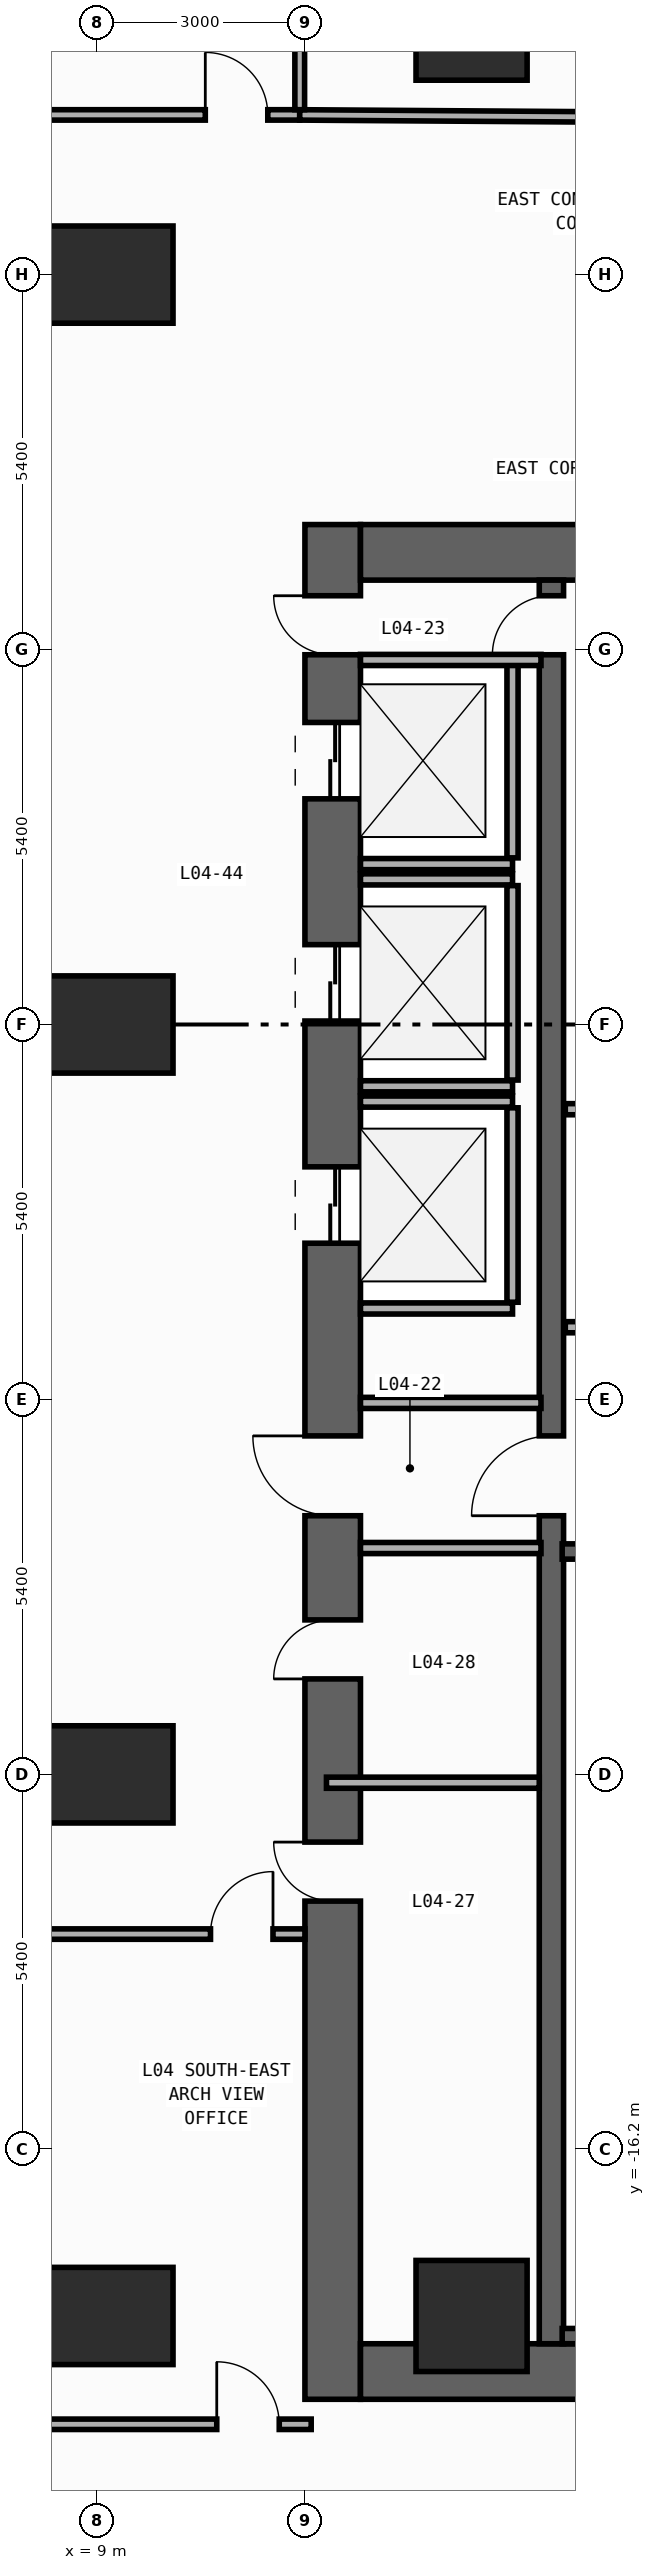
"""IFC4 building model, lengths in metres.
Left out: names, types, materials, properties, quantities, classifications, styles, units other than length and angle.
Written with IfcOpenShell. Run it as: python <this file> out.ifc"""

import sys

from ifc_helpers import new_model, si_unit, direction, frame, frame_2d, origin, origin_2d, place, context, subcontext, project, spatial, rectangle, extrude, element, fill, save


model = new_model("IFC4")
c1 = context("Model", 3, precision=1e-05, world=origin(), true_north=direction((0.0, 1.0)))
c2 = subcontext(c1, "Body", "Model", "MODEL_VIEW")
j1 = project(units=[si_unit("LENGTHUNIT", "METRE"), si_unit("PLANEANGLEUNIT", "RADIAN")], contexts=[c1])
p1 = place(None, origin())
s1 = spatial("IfcSite", under=j1, at=p1, CompositionType="ELEMENT")
p2 = place(p1, origin())
s2 = spatial("IfcBuilding", under=s1, at=p2, CompositionType="ELEMENT")
p3 = place(p2, frame((0.0, 0.0, 16.0)))
s3 = spatial("IfcBuildingStorey", under=s2, at=p3, CompositionType="ELEMENT", Elevation=16.0)
p4 = place(p3, frame((12.4, -19.8, 0.0), z_axis=(0.0, 0.0, 1.0), x_axis=(0.0, 1.0, 0.0)))
e1 = element("IfcWall", 1, at=p4, inside=s3, PredefinedType="SHEAR", context=c2, shape_type="SweptSolid", body=[
    extrude(rectangle(XDim=27.0, YDim=0.8, at=frame_2d((13.5, 0.0))), origin(), (0.0, 0.0, 1.0), 4.55),
])
p5 = place(p4, frame((23.05, 0.0, 0.0)))
e2 = element("IfcOpeningElement", 2, at=p5, cuts=e1, PredefinedType="OPENING", context=c2, shape_type="SweptSolid", body=[
    extrude(rectangle(XDim=1.1, YDim=2.2, at=frame_2d((0.55, 1.1))), frame((0.0, 0.41, 0.0), z_axis=(0.0, -1.0, 0.0), x_axis=(1.0, 0.0, 0.0)), (0.0, 0.0, 1.0), 0.82),
])
p6 = place(p4, frame((19.85, 0.0, 0.0)))
e3 = element("IfcOpeningElement", 3, at=p6, cuts=e1, PredefinedType="OPENING", context=c2, shape_type="SweptSolid", body=[
    extrude(rectangle(XDim=1.1, YDim=2.2, at=frame_2d((0.55, 1.1))), frame((0.0, 0.41, 0.0), z_axis=(0.0, -1.0, 0.0), x_axis=(1.0, 0.0, 0.0)), (0.0, 0.0, 1.0), 0.82),
])
p7 = place(p4, frame((16.65, 0.0, 0.0)))
e4 = element("IfcOpeningElement", 4, at=p7, cuts=e1, PredefinedType="OPENING", context=c2, shape_type="SweptSolid", body=[
    extrude(rectangle(XDim=1.1, YDim=2.2, at=frame_2d((0.55, 1.1))), frame((0.0, 0.41, 0.0), z_axis=(0.0, -1.0, 0.0), x_axis=(1.0, 0.0, 0.0)), (0.0, 0.0, 1.0), 0.82),
])
p8 = place(p4, frame((7.175, 0.0, 0.0)))
e5 = element("IfcOpeningElement", 5, at=p8, cuts=e1, PredefinedType="OPENING", context=c2, shape_type="SweptSolid", body=[
    extrude(rectangle(XDim=0.85, YDim=2.1, at=frame_2d((0.425, 1.05))), frame((0.0, 0.41, 0.0), z_axis=(0.0, -1.0, 0.0), x_axis=(1.0, 0.0, 0.0)), (0.0, 0.0, 1.0), 0.82),
])
p9 = place(p4, frame((10.375, 0.0, 0.0)))
e6 = element("IfcOpeningElement", 6, at=p9, cuts=e1, PredefinedType="OPENING", context=c2, shape_type="SweptSolid", body=[
    extrude(rectangle(XDim=0.85, YDim=2.1, at=frame_2d((0.425, 1.05))), frame((0.0, 0.41, 0.0), z_axis=(0.0, -1.0, 0.0), x_axis=(1.0, 0.0, 0.0)), (0.0, 0.0, 1.0), 0.82),
])
p10 = place(p4, frame((12.725, 0.0, 0.0)))
e7 = element("IfcOpeningElement", 7, at=p10, cuts=e1, PredefinedType="OPENING", context=c2, shape_type="SweptSolid", body=[
    extrude(rectangle(XDim=1.15, YDim=2.2, at=frame_2d((0.575, 1.1))), frame((0.0, 0.41, 0.0), z_axis=(0.0, -1.0, 0.0), x_axis=(1.0, 0.0, 0.0)), (0.0, 0.0, 1.0), 0.82),
])
p11 = place(p4, frame((25.125, 0.0, 0.0)))
e8 = element("IfcOpeningElement", 8, at=p11, cuts=e1, PredefinedType="OPENING", context=c2, shape_type="SweptSolid", body=[
    extrude(rectangle(XDim=0.85, YDim=2.1, at=frame_2d((0.425, 1.05))), frame((0.0, 0.41, 0.0), z_axis=(0.0, -1.0, 0.0), x_axis=(1.0, 0.0, 0.0)), (0.0, 0.0, 1.0), 0.82),
])
for number, where, z_axis, x_axis in (
    (9, (12.8, -19.4, 0.0), (0.0, 0.0, 1.0), (1.0, 0.0, 0.0)),
    (10, (12.8, 6.8, 0.0), (0.0, 0.0, 1.0), (1.0, 0.0, 0.0)),
):
    element("IfcWall", number, at=place(p3, frame(where, z_axis=z_axis, x_axis=x_axis)), inside=s3, PredefinedType="SHEAR", context=c2, shape_type="SweptSolid", body=[
        extrude(rectangle(XDim=6.8, YDim=0.8, at=frame_2d((3.4, 0.0))), origin(), (0.0, 0.0, 1.0), 4.55),
    ])
p12 = place(p3, frame((15.55, -19.0, 0.0), z_axis=(0.0, 0.0, 1.0), x_axis=(0.0, 1.0, 0.0)))
e11 = element("IfcWall", 11, at=p12, inside=s3, PredefinedType="SHEAR", context=c2, shape_type="SweptSolid", body=[
    extrude(rectangle(XDim=25.4, YDim=0.35, at=frame_2d((12.7, 0.0))), origin(), (0.0, 0.0, 1.0), 4.55),
])
p13 = place(p12, frame((11.925, 0.0, 0.0)))
e12 = element("IfcOpeningElement", 12, at=p13, cuts=e11, PredefinedType="OPENING", context=c2, shape_type="SweptSolid", body=[
    extrude(rectangle(XDim=1.15, YDim=2.2, at=frame_2d((0.575, 1.1))), frame((0.0, 0.185, 0.0), z_axis=(0.0, -1.0, 0.0), x_axis=(1.0, 0.0, 0.0)), (0.0, 0.0, 1.0), 0.37),
])
p14 = place(p12, frame((24.325, 0.0, 0.0)))
e13 = element("IfcOpeningElement", 13, at=p14, cuts=e11, PredefinedType="OPENING", context=c2, shape_type="SweptSolid", body=[
    extrude(rectangle(XDim=0.85, YDim=2.1, at=frame_2d((0.425, 1.05))), frame((0.0, 0.185, 0.0), z_axis=(0.0, -1.0, 0.0), x_axis=(1.0, 0.0, 0.0)), (0.0, 0.0, 1.0), 0.37),
])
p15 = place(p3, frame((15.705, -18.89, 0.0), z_axis=(0.0, 0.0, 1.0), x_axis=(1.0, 0.0, 0.0)))
e14 = element("IfcWall", 14, at=p15, inside=s3, PredefinedType="SHEAR", context=c2, shape_type="SweptSolid", body=[
    extrude(rectangle(XDim=3.915, YDim=0.22, at=frame_2d((1.958, 0.0))), origin(), (0.0, 0.0, 1.0), 4.55),
])
p16 = place(p3, frame((19.62, -7.59, 0.0), z_axis=(0.0, 0.0, 1.0), x_axis=(-1.0, 0.0, 0.0)))
e15 = element("IfcWall", 15, at=p16, inside=s3, PredefinedType="SHEAR", context=c2, shape_type="SweptSolid", body=[
    extrude(rectangle(XDim=3.915, YDim=0.22, at=frame_2d((1.958, 0.0))), origin(), (0.0, 0.0, 1.0), 4.55),
])
p17 = place(p16, frame((1.08, 0.0, 0.0)))
e16 = element("IfcOpeningElement", 16, at=p17, cuts=e15, PredefinedType="OPENING", context=c2, shape_type="SweptSolid", body=[
    extrude(rectangle(XDim=1.1, YDim=2.2, at=frame_2d((0.55, 1.1))), frame((0.0, 0.12, 0.0), z_axis=(0.0, -1.0, 0.0), x_axis=(1.0, 0.0, 0.0)), (0.0, 0.0, 1.0), 0.24),
])
for number, where, z_axis, x_axis in (
    (17, (9.2, -18.6, 0.0), (0.0, 0.0, 1.0), (1.0, 0.0, 0.0)),
    (18, (9.2, -10.8, 0.0), (0.0, 0.0, 1.0), (1.0, 0.0, 0.0)),
    (19, (9.2, 0.0, 0.0), (0.0, 0.0, 1.0), (1.0, 0.0, 0.0)),
    (20, (9.2, 10.8, 0.0), (0.0, 0.0, 1.0), (1.0, 0.0, 0.0)),
):
    element("IfcColumn", number, at=place(p3, frame(where, z_axis=z_axis, x_axis=x_axis)), inside=s3, PredefinedType="COLUMN", context=c2, shape_type="SweptSolid", body=[
        extrude(rectangle(XDim=1.8, YDim=1.4, at=origin_2d()), origin(), (0.0, 0.0, 1.0), 5.0),
    ])
for number, where, z_axis, x_axis in (
    (21, (14.4, -18.6, 0.0), (0.0, 0.0, 1.0), (1.0, 0.0, 0.0)),
    (22, (14.4, 14.4, 0.0), (0.0, 0.0, 1.0), (1.0, 0.0, 0.0)),
):
    element("IfcColumn", number, at=place(p3, frame(where, z_axis=z_axis, x_axis=x_axis)), inside=s3, PredefinedType="COLUMN", context=c2, shape_type="SweptSolid", body=[
        extrude(rectangle(XDim=1.6, YDim=1.6, at=origin_2d()), origin(), (0.0, 0.0, 1.0), 5.0),
    ])
p18 = place(p3, frame((12.8, 2.31, 0.0), z_axis=(0.0, 0.0, 1.0), x_axis=(1.0, 0.0, 0.0)))
e23 = element("IfcWall", 23, at=p18, inside=s3, PredefinedType="STANDARD", context=c2, shape_type="SweptSolid", body=[
    extrude(rectangle(XDim=2.19, YDim=0.16, at=frame_2d((1.095, 0.0))), origin(), (0.0, 0.0, 1.0), 4.55),
])
p19 = place(p3, frame((14.99, 2.4, 0.0), z_axis=(0.0, 0.0, 1.0), x_axis=(0.0, 1.0, 0.0)))
e24 = element("IfcWall", 24, at=p19, inside=s3, PredefinedType="STANDARD", context=c2, shape_type="SweptSolid", body=[
    extrude(rectangle(XDim=2.8, YDim=0.16, at=frame_2d((1.4, 0.0))), origin(), (0.0, 0.0, 1.0), 4.55),
])
for number, where, z_axis, x_axis in (
    (25, (12.8, -0.89, 0.0), (0.0, 0.0, 1.0), (1.0, 0.0, 0.0)),
    (26, (12.8, 2.09, 0.0), (0.0, 0.0, 1.0), (1.0, 0.0, 0.0)),
):
    element("IfcWall", number, at=place(p3, frame(where, z_axis=z_axis, x_axis=x_axis)), inside=s3, PredefinedType="STANDARD", context=c2, shape_type="SweptSolid", body=[
        extrude(rectangle(XDim=2.19, YDim=0.16, at=frame_2d((1.095, 0.0))), origin(), (0.0, 0.0, 1.0), 4.55),
    ])
p20 = place(p3, frame((14.99, -0.8, 0.0), z_axis=(0.0, 0.0, 1.0), x_axis=(0.0, 1.0, 0.0)))
e27 = element("IfcWall", 27, at=p20, inside=s3, PredefinedType="STANDARD", context=c2, shape_type="SweptSolid", body=[
    extrude(rectangle(XDim=2.8, YDim=0.16, at=frame_2d((1.4, 0.0))), origin(), (0.0, 0.0, 1.0), 4.55),
])
for number, where, z_axis, x_axis in (
    (28, (12.8, -4.09, 0.0), (0.0, 0.0, 1.0), (1.0, 0.0, 0.0)),
    (29, (12.8, -1.11, 0.0), (0.0, 0.0, 1.0), (1.0, 0.0, 0.0)),
):
    element("IfcWall", number, at=place(p3, frame(where, z_axis=z_axis, x_axis=x_axis)), inside=s3, PredefinedType="STANDARD", context=c2, shape_type="SweptSolid", body=[
        extrude(rectangle(XDim=2.19, YDim=0.16, at=frame_2d((1.095, 0.0))), origin(), (0.0, 0.0, 1.0), 4.55),
    ])
p21 = place(p3, frame((14.99, -4.0, 0.0), z_axis=(0.0, 0.0, 1.0), x_axis=(0.0, 1.0, 0.0)))
e30 = element("IfcWall", 30, at=p21, inside=s3, PredefinedType="STANDARD", context=c2, shape_type="SweptSolid", body=[
    extrude(rectangle(XDim=2.8, YDim=0.16, at=frame_2d((1.4, 0.0))), origin(), (0.0, 0.0, 1.0), 4.55),
])
p22 = place(p3, frame((15.75, -4.36, 0.0), z_axis=(0.0, 0.0, 1.0), x_axis=(1.0, 0.0, 0.0)))
e31 = element("IfcWall", 31, at=p22, inside=s3, PredefinedType="STANDARD", context=c2, shape_type="SweptSolid", body=[
    extrude(rectangle(XDim=3.8, YDim=0.16, at=frame_2d((1.9, 0.0))), origin(), (0.0, 0.0, 1.0), 4.55),
])
p23 = place(p22, frame((1.47, 0.0, 0.0)))
e32 = element("IfcOpeningElement", 32, at=p23, cuts=e31, PredefinedType="OPENING", context=c2, shape_type="SweptSolid", body=[
    extrude(rectangle(XDim=1.15, YDim=2.2, at=frame_2d((0.575, 1.1))), frame((0.0, 0.09, 0.0), z_axis=(0.0, -1.0, 0.0), x_axis=(1.0, 0.0, 0.0)), (0.0, 0.0, 1.0), 0.18),
])
p24 = place(p3, frame((15.75, -1.22, 0.0), z_axis=(0.0, 0.0, 1.0), x_axis=(1.0, 0.0, 0.0)))
e33 = element("IfcWall", 33, at=p24, inside=s3, PredefinedType="STANDARD", context=c2, shape_type="SweptSolid", body=[
    extrude(rectangle(XDim=3.8, YDim=0.16, at=frame_2d((1.9, 0.0))), origin(), (0.0, 0.0, 1.0), 4.55),
])
for number, where, z_axis, x_axis in (
    (34, (12.8, -5.45, 0.0), (0.0, 0.0, 1.0), (1.0, 0.0, 0.0)),
    (35, (12.8, -7.54, 0.0), (0.0, 0.0, 1.0), (1.0, 0.0, 0.0)),
    (36, (12.8, 5.25, 0.0), (0.0, 0.0, 1.0), (1.0, 0.0, 0.0)),
):
    element("IfcWall", number, at=place(p3, frame(where, z_axis=z_axis, x_axis=x_axis)), inside=s3, PredefinedType="STANDARD", context=c2, shape_type="SweptSolid", body=[
        extrude(rectangle(XDim=2.6, YDim=0.16, at=frame_2d((1.3, 0.0))), origin(), (0.0, 0.0, 1.0), 4.55),
    ])
p25 = place(p3, frame((12.31, -10.92, 0.0), z_axis=(0.0, 0.0, 1.0), x_axis=(1.0, 0.0, 0.0)))
e37 = element("IfcWall", 37, at=p25, inside=s3, PredefinedType="PARTITIONING", context=c2, shape_type="SweptSolid", body=[
    extrude(rectangle(XDim=3.065, YDim=0.16, at=frame_2d((1.532, 0.0))), origin(), (0.0, 0.0, 1.0), 3.65),
])
p26 = place(p3, frame((8.205, 13.1, 0.0), z_axis=(0.0, 0.0, 1.0), x_axis=(1.0, 0.0, 0.0)))
e38 = element("IfcWall", 38, at=p26, inside=s3, PredefinedType="PARTITIONING", context=c2, shape_type="SweptSolid", body=[
    extrude(rectangle(XDim=3.72, YDim=0.15, at=frame_2d((1.86, 0.0))), origin(), (0.0, 0.0, 1.0), 4.55),
])
p27 = place(p26, frame((2.36, 0.0, 0.0)))
e39 = element("IfcOpeningElement", 39, at=p27, cuts=e38, PredefinedType="OPENING", context=c2, shape_type="SweptSolid", body=[
    extrude(rectangle(XDim=0.9, YDim=2.15, at=frame_2d((0.45, 1.075))), frame((0.0, 0.085, 0.0), z_axis=(0.0, -1.0, 0.0), x_axis=(1.0, 0.0, 0.0)), (0.0, 0.0, 1.0), 0.17),
])
p28 = place(p3, frame((8.205, -13.1, 0.0), z_axis=(0.0, 0.0, 1.0), x_axis=(1.0, 0.0, 0.0)))
e40 = element("IfcWall", 40, at=p28, inside=s3, PredefinedType="PARTITIONING", context=c2, shape_type="SweptSolid", body=[
    extrude(rectangle(XDim=3.795, YDim=0.15, at=frame_2d((1.897, 0.0))), origin(), (0.0, 0.0, 1.0), 4.55),
])
p29 = place(p28, frame((2.435, 0.0, 0.0)))
e41 = element("IfcOpeningElement", 41, at=p29, cuts=e40, PredefinedType="OPENING", context=c2, shape_type="SweptSolid", body=[
    extrude(rectangle(XDim=0.9, YDim=2.15, at=frame_2d((0.45, 1.075))), frame((0.0, 0.085, 0.0), z_axis=(0.0, -1.0, 0.0), x_axis=(1.0, 0.0, 0.0)), (0.0, 0.0, 1.0), 0.17),
])
p30 = place(p3, frame((11.925, 13.1, 0.0), z_axis=(0.0, 0.0, 1.0), x_axis=(0.999976690727, -0.006827737682, 0.0)))
e42 = element("IfcWall", 42, at=p30, inside=s3, PredefinedType="PARTITIONING", context=c2, shape_type="SweptSolid", body=[
    extrude(rectangle(XDim=8.51, YDim=0.15, at=frame_2d((4.255, 0.0))), origin(), (0.0, 0.0, 1.0), 4.55),
])
p31 = place(p30, frame((5.123, 0.0, 0.0)))
e43 = element("IfcOpeningElement", 43, at=p31, cuts=e42, PredefinedType="OPENING", context=c2, shape_type="SweptSolid", body=[
    extrude(rectangle(XDim=0.9, YDim=2.15, at=frame_2d((0.45, 1.075))), frame((0.0, 0.085, 0.0), z_axis=(0.0, -1.0, 0.0), x_axis=(1.0, 0.0, 0.0)), (0.0, 0.0, 1.0), 0.17),
])
p32 = place(p3, frame((8.205, -20.16, 0.0), z_axis=(0.0, 0.0, 1.0), x_axis=(1.0, 0.0, 0.0)))
e44 = element("IfcWall", 44, at=p32, inside=s3, PredefinedType="PARTITIONING", context=c2, shape_type="SweptSolid", body=[
    extrude(rectangle(XDim=3.885, YDim=0.15, at=frame_2d((1.942, 0.0))), origin(), (0.0, 0.0, 1.0), 4.55),
])
p33 = place(p32, frame((2.525, 0.0, 0.0)))
e45 = element("IfcOpeningElement", 45, at=p33, cuts=e44, PredefinedType="OPENING", context=c2, shape_type="SweptSolid", body=[
    extrude(rectangle(XDim=0.9, YDim=2.15, at=frame_2d((0.45, 1.075))), frame((0.0, 0.085, 0.0), z_axis=(0.0, -1.0, 0.0), x_axis=(1.0, 0.0, 0.0)), (0.0, 0.0, 1.0), 0.17),
])
p34 = place(p3, frame((11.925, 13.175, 0.0), z_axis=(0.0, 0.0, 1.0), x_axis=(0.0, 1.0, 0.0)))
e46 = element("IfcWall", 46, at=p34, inside=s3, PredefinedType="PARTITIONING", context=c2, shape_type="SweptSolid", body=[
    extrude(rectangle(XDim=12.823, YDim=0.14, at=frame_2d((6.411, 0.0))), origin(), (0.0, 0.0, 1.0), 4.55),
])
p35 = place(p5, origin())
e47 = element("IfcDoor", 47, at=p35, inside=s3, OperationType="DOUBLE_DOOR_SLIDING", PredefinedType="DOOR", context=c2, shape_type="SweptSolid", body=[
    extrude(rectangle(XDim=1.1, YDim=2.2, at=frame_2d((0.55, 1.1))), frame((0.0, 0.025, 0.0), z_axis=(0.0, -1.0, 0.0), x_axis=(1.0, 0.0, 0.0)), (0.0, 0.0, 1.0), 0.05),
])
fill(e2, e47)
p36 = place(p6, origin())
e48 = element("IfcDoor", 48, at=p36, inside=s3, OperationType="DOUBLE_DOOR_SLIDING", PredefinedType="DOOR", context=c2, shape_type="SweptSolid", body=[
    extrude(rectangle(XDim=1.1, YDim=2.2, at=frame_2d((0.55, 1.1))), frame((0.0, 0.025, 0.0), z_axis=(0.0, -1.0, 0.0), x_axis=(1.0, 0.0, 0.0)), (0.0, 0.0, 1.0), 0.05),
])
fill(e3, e48)
p37 = place(p7, origin())
e49 = element("IfcDoor", 49, at=p37, inside=s3, OperationType="DOUBLE_DOOR_SLIDING", PredefinedType="DOOR", context=c2, shape_type="SweptSolid", body=[
    extrude(rectangle(XDim=1.1, YDim=2.2, at=frame_2d((0.55, 1.1))), frame((0.0, 0.025, 0.0), z_axis=(0.0, -1.0, 0.0), x_axis=(1.0, 0.0, 0.0)), (0.0, 0.0, 1.0), 0.05),
])
fill(e4, e49)
p38 = place(p8, origin())
e50 = element("IfcDoor", 50, at=p38, inside=s3, OperationType="SINGLE_SWING_RIGHT", PredefinedType="DOOR", context=c2, shape_type="SweptSolid", body=[
    extrude(rectangle(XDim=0.85, YDim=2.1, at=frame_2d((0.425, 1.05))), frame((0.0, 0.025, 0.0), z_axis=(0.0, -1.0, 0.0), x_axis=(1.0, 0.0, 0.0)), (0.0, 0.0, 1.0), 0.05),
])
fill(e5, e50)
p39 = place(p9, origin())
e51 = element("IfcDoor", 51, at=p39, inside=s3, OperationType="SINGLE_SWING_LEFT", PredefinedType="DOOR", context=c2, shape_type="SweptSolid", body=[
    extrude(rectangle(XDim=0.85, YDim=2.1, at=frame_2d((0.425, 1.05))), frame((0.0, 0.025, 0.0), z_axis=(0.0, -1.0, 0.0), x_axis=(1.0, 0.0, 0.0)), (0.0, 0.0, 1.0), 0.05),
])
fill(e6, e51)
p40 = place(p10, origin())
e52 = element("IfcDoor", 52, at=p40, inside=s3, OperationType="SINGLE_SWING_RIGHT", PredefinedType="DOOR", context=c2, shape_type="SweptSolid", body=[
    extrude(rectangle(XDim=1.15, YDim=2.2, at=frame_2d((0.575, 1.1))), frame((0.0, 0.025, 0.0), z_axis=(0.0, -1.0, 0.0), x_axis=(1.0, 0.0, 0.0)), (0.0, 0.0, 1.0), 0.05),
])
fill(e7, e52)
p41 = place(p13, origin())
e53 = element("IfcDoor", 53, at=p41, inside=s3, OperationType="SINGLE_SWING_LEFT", PredefinedType="DOOR", context=c2, shape_type="SweptSolid", body=[
    extrude(rectangle(XDim=1.15, YDim=2.2, at=frame_2d((0.575, 1.1))), frame((0.0, 0.025, 0.0), z_axis=(0.0, -1.0, 0.0), x_axis=(1.0, 0.0, 0.0)), (0.0, 0.0, 1.0), 0.05),
])
fill(e12, e53)
p42 = place(p11, origin())
e54 = element("IfcDoor", 54, at=p42, inside=s3, OperationType="SINGLE_SWING_RIGHT", PredefinedType="DOOR", context=c2, shape_type="SweptSolid", body=[
    extrude(rectangle(XDim=0.85, YDim=2.1, at=frame_2d((0.425, 1.05))), frame((0.0, 0.025, 0.0), z_axis=(0.0, -1.0, 0.0), x_axis=(1.0, 0.0, 0.0)), (0.0, 0.0, 1.0), 0.05),
])
fill(e8, e54)
p43 = place(p14, origin())
e55 = element("IfcDoor", 55, at=p43, inside=s3, OperationType="SINGLE_SWING_LEFT", PredefinedType="DOOR", context=c2, shape_type="SweptSolid", body=[
    extrude(rectangle(XDim=0.85, YDim=2.1, at=frame_2d((0.425, 1.05))), frame((0.0, 0.025, 0.0), z_axis=(0.0, -1.0, 0.0), x_axis=(1.0, 0.0, 0.0)), (0.0, 0.0, 1.0), 0.05),
])
fill(e13, e55)
p44 = place(p27, origin())
e56 = element("IfcDoor", 56, at=p44, inside=s3, OperationType="SINGLE_SWING_LEFT", PredefinedType="DOOR", context=c2, shape_type="SweptSolid", body=[
    extrude(rectangle(XDim=0.9, YDim=2.15, at=frame_2d((0.45, 1.075))), frame((0.0, 0.025, 0.0), z_axis=(0.0, -1.0, 0.0), x_axis=(1.0, 0.0, 0.0)), (0.0, 0.0, 1.0), 0.05),
])
fill(e39, e56)
p45 = place(p29, origin())
e57 = element("IfcDoor", 57, at=p45, inside=s3, OperationType="SINGLE_SWING_RIGHT", PredefinedType="DOOR", context=c2, shape_type="SweptSolid", body=[
    extrude(rectangle(XDim=0.9, YDim=2.15, at=frame_2d((0.45, 1.075))), frame((0.0, 0.025, 0.0), z_axis=(0.0, -1.0, 0.0), x_axis=(1.0, 0.0, 0.0)), (0.0, 0.0, 1.0), 0.05),
])
fill(e41, e57)
p46 = place(p33, origin())
e58 = element("IfcDoor", 58, at=p46, inside=s3, OperationType="SINGLE_SWING_LEFT", PredefinedType="DOOR", context=c2, shape_type="SweptSolid", body=[
    extrude(rectangle(XDim=0.9, YDim=2.15, at=frame_2d((0.45, 1.075))), frame((0.0, 0.025, 0.0), z_axis=(0.0, -1.0, 0.0), x_axis=(1.0, 0.0, 0.0)), (0.0, 0.0, 1.0), 0.05),
])
fill(e45, e58)
save(model, sys.argv[1])
